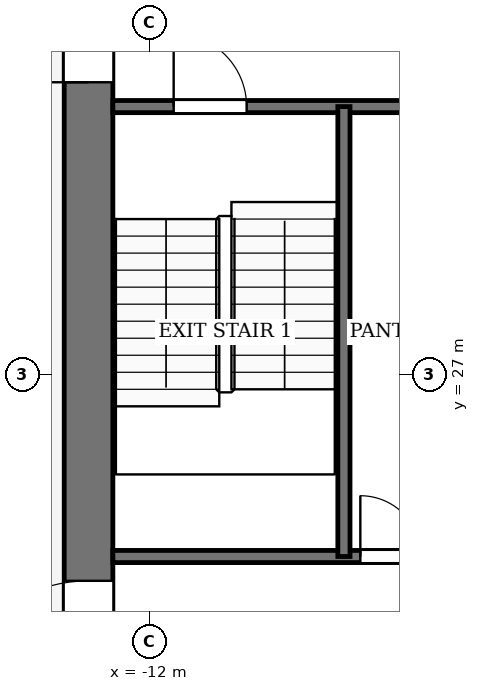
"""IFC4 building model, lengths in metres.
Left out: names, types, materials, properties, quantities, classifications, styles, units other than length and angle.
Written with IfcOpenShell. Run it as: python <this file> out.ifc"""

import sys

from ifc_helpers import new_model, si_unit, direction, frame, frame_2d, origin, place, context, subcontext, project, spatial, rectangle, extrude, element, fill, save


model = new_model("IFC4")
c1 = context("Model", 3, precision=1e-05, world=origin(), true_north=direction((0.0, 1.0)))
c2 = subcontext(c1, "Body", "Model", "MODEL_VIEW")
j1 = project(units=[si_unit("LENGTHUNIT", "METRE"), si_unit("PLANEANGLEUNIT", "RADIAN")], contexts=[c1])
p1 = place(None, origin())
s1 = spatial("IfcSite", under=j1, at=p1, CompositionType="ELEMENT")
p2 = place(p1, origin())
s2 = spatial("IfcBuilding", under=s1, at=p2, CompositionType="ELEMENT")
p3 = place(p2, frame((0.0, 0.0, 262.0)))
s3 = spatial("IfcBuildingStorey", under=s2, at=p3, CompositionType="ELEMENT", Elevation=262.0)
p4 = place(p3, frame((-13.0, 18.4, -0.13), z_axis=(0.0, 0.0, 1.0), x_axis=(0.0, 1.0, 0.0)))
e1 = element("IfcWall", 1, at=p4, inside=s3, PredefinedType="SHEAR", context=c2, shape_type="SweptSolid", body=[
    extrude(rectangle(XDim=19.2, YDim=0.8, at=frame_2d((9.6, 0.0))), origin(), (0.0, 0.0, 1.0), 4.0),
])
p5 = place(p4, frame((2.8, 0.0, 0.13)))
e2 = element("IfcOpeningElement", 2, at=p5, cuts=e1, PredefinedType="OPENING", context=c2, shape_type="SweptSolid", body=[
    extrude(rectangle(XDim=2.4, YDim=2.4, at=frame_2d((1.2, 1.2))), frame((0.0, 0.41, 0.0), z_axis=(0.0, -1.0, 0.0), x_axis=(1.0, 0.0, 0.0)), (0.0, 0.0, 1.0), 0.82),
])
p6 = place(p4, frame((13.4, 0.0, 0.13)))
e3 = element("IfcOpeningElement", 3, at=p6, cuts=e1, PredefinedType="OPENING", context=c2, shape_type="SweptSolid", body=[
    extrude(rectangle(XDim=1.4, YDim=2.2, at=frame_2d((0.7, 1.1))), frame((0.0, 0.41, 0.0), z_axis=(0.0, -1.0, 0.0), x_axis=(1.0, 0.0, 0.0)), (0.0, 0.0, 1.0), 0.82),
])
p7 = place(p3, frame((-12.6, 24.0, 0.0), z_axis=(0.0, 0.0, 1.0), x_axis=(1.0, 0.0, 0.0)))
e4 = element("IfcWall", 4, at=p7, inside=s3, PredefinedType="PARTITIONING", context=c2, shape_type="SweptSolid", body=[
    extrude(rectangle(XDim=6.6, YDim=0.2, at=frame_2d((3.3, 0.0))), origin(), (0.0, 0.0, 1.0), 3.87),
])
p8 = place(p7, frame((4.07, 0.0, 0.0)))
e5 = element("IfcOpeningElement", 5, at=p8, cuts=e4, PredefinedType="OPENING", context=c2, shape_type="SweptSolid", body=[
    extrude(rectangle(XDim=1.0, YDim=2.1, at=frame_2d((0.5, 1.05))), frame((0.0, 0.11, 0.0), z_axis=(0.0, -1.0, 0.0), x_axis=(1.0, 0.0, 0.0)), (0.0, 0.0, 1.0), 0.22),
])
p9 = place(p7, frame((5.57, 0.0, 0.0)))
e6 = element("IfcOpeningElement", 6, at=p9, cuts=e4, PredefinedType="OPENING", context=c2, shape_type="SweptSolid", body=[
    extrude(rectangle(XDim=0.8, YDim=2.1, at=frame_2d((0.4, 1.05))), frame((0.0, 0.11, 0.0), z_axis=(0.0, -1.0, 0.0), x_axis=(1.0, 0.0, 0.0)), (0.0, 0.0, 1.0), 0.22),
])
p10 = place(p3, frame((-12.6, 31.4, 0.0), z_axis=(0.0, 0.0, 1.0), x_axis=(1.0, 0.0, 0.0)))
e7 = element("IfcWall", 7, at=p10, inside=s3, PredefinedType="PARTITIONING", context=c2, shape_type="SweptSolid", body=[
    extrude(rectangle(XDim=6.6, YDim=0.2, at=frame_2d((3.3, 0.0))), origin(), (0.0, 0.0, 1.0), 3.87),
])
p11 = place(p10, frame((1.0, 0.0, 0.0)))
e8 = element("IfcOpeningElement", 8, at=p11, cuts=e7, PredefinedType="OPENING", context=c2, shape_type="SweptSolid", body=[
    extrude(rectangle(XDim=1.2, YDim=2.2, at=frame_2d((0.6, 1.1))), frame((0.0, 0.11, 0.0), z_axis=(0.0, -1.0, 0.0), x_axis=(1.0, 0.0, 0.0)), (0.0, 0.0, 1.0), 0.22),
])
p12 = place(p3, frame((-8.8, 24.0, 0.0), z_axis=(0.0, 0.0, 1.0), x_axis=(0.0, 1.0, 0.0)))
e9 = element("IfcWall", 9, at=p12, inside=s3, PredefinedType="PARTITIONING", context=c2, shape_type="SweptSolid", body=[
    extrude(rectangle(XDim=7.4, YDim=0.2, at=frame_2d((3.7, 0.0))), origin(), (0.0, 0.0, 1.0), 3.87),
])
p13 = place(p8, origin())
e10 = element("IfcDoor", 10, at=p13, inside=s3, OperationType="SINGLE_SWING_RIGHT", PredefinedType="DOOR", context=c2, shape_type="SweptSolid", body=[
    extrude(rectangle(XDim=1.0, YDim=2.1, at=frame_2d((0.5, 1.05))), frame((0.0, 0.025, 0.0), z_axis=(0.0, -1.0, 0.0), x_axis=(1.0, 0.0, 0.0)), (0.0, 0.0, 1.0), 0.05),
])
fill(e5, e10)
p14 = place(p11, origin())
e11 = element("IfcDoor", 11, at=p14, inside=s3, OperationType="SINGLE_SWING_RIGHT", PredefinedType="DOOR", context=c2, shape_type="SweptSolid", body=[
    extrude(rectangle(XDim=1.2, YDim=2.2, at=frame_2d((0.6, 1.1))), frame((0.0, 0.025, 0.0), z_axis=(0.0, -1.0, 0.0), x_axis=(1.0, 0.0, 0.0)), (0.0, 0.0, 1.0), 0.05),
])
fill(e8, e11)
p15 = place(p5, origin())
e12 = element("IfcDoor", 12, at=p15, inside=s3, OperationType="DOUBLE_DOOR_SINGLE_SWING", PredefinedType="DOOR", context=c2, shape_type="SweptSolid", body=[
    extrude(rectangle(XDim=2.4, YDim=2.4, at=frame_2d((1.2, 1.2))), frame((0.0, 0.025, 0.0), z_axis=(0.0, -1.0, 0.0), x_axis=(1.0, 0.0, 0.0)), (0.0, 0.0, 1.0), 0.05),
])
fill(e2, e12)
p16 = place(p6, origin())
e13 = element("IfcDoor", 13, at=p16, inside=s3, OperationType="SINGLE_SWING_RIGHT", PredefinedType="DOOR", context=c2, shape_type="SweptSolid", body=[
    extrude(rectangle(XDim=1.4, YDim=2.2, at=frame_2d((0.7, 1.1))), frame((0.0, 0.025, 0.0), z_axis=(0.0, -1.0, 0.0), x_axis=(1.0, 0.0, 0.0)), (0.0, 0.0, 1.0), 0.05),
])
fill(e3, e13)
save(model, sys.argv[1])
